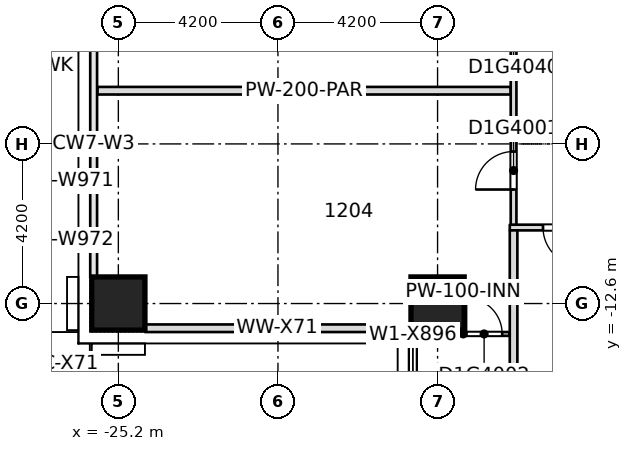
"""IFC4 building model, lengths in metres.
Left out: names, types, materials, properties, quantities, classifications, styles, units other than length and angle.
Written with IfcOpenShell. Run it as: python <this file> out.ifc"""

import sys

from ifc_helpers import new_model, si_unit, direction, frame, frame_2d, origin, origin_2d, place, context, subcontext, project, spatial, rectangle, extrude, element, fill, save


model = new_model("IFC4")
c1 = context("Model", 3, precision=1e-05, world=origin(), true_north=direction((0.0, 1.0)))
c2 = subcontext(c1, "Body", "Model", "MODEL_VIEW")
j1 = project(units=[si_unit("LENGTHUNIT", "METRE"), si_unit("PLANEANGLEUNIT", "RADIAN")], contexts=[c1])
p1 = place(None, origin())
s1 = spatial("IfcSite", under=j1, at=p1, CompositionType="ELEMENT")
p2 = place(p1, origin())
s2 = spatial("IfcBuilding", under=s1, at=p2, CompositionType="ELEMENT")
p3 = place(p2, frame((0.0, 0.0, 55.2)))
s3 = spatial("IfcBuildingStorey", under=s2, at=p3, CompositionType="ELEMENT", Elevation=55.2)
for number, where, z_axis, x_axis in (
    (1, (-25.2, -12.6, -0.32), (0.0, 0.0, 1.0), (1.0, 0.0, 0.0)),
    (2, (-16.8, -12.6, -0.32), (0.0, 0.0, 1.0), (1.0, 0.0, 0.0)),
):
    element("IfcColumn", number, at=place(p3, frame(where, z_axis=z_axis, x_axis=x_axis)), inside=s3, PredefinedType="COLUMN", context=c2, shape_type="SweptSolid", body=[
        extrude(rectangle(XDim=1.4, YDim=1.4, at=origin_2d()), origin(), (0.0, 0.0, 1.0), 3.45),
    ])
p4 = place(p3, frame((-17.35, -13.4, 0.0), z_axis=(0.0, 0.0, 1.0), x_axis=(1.0, 0.0, 0.0)))
e3 = element("IfcWall", 3, at=p4, inside=s3, PredefinedType="PARTITIONING", context=c2, shape_type="SweptSolid", body=[
    extrude(rectangle(XDim=2.45, YDim=0.1, at=frame_2d((1.225, 0.0))), origin(), (0.0, 0.0, 1.0), 3.13),
])
p5 = place(p4, frame((1.3, 0.0, 0.0)))
e4 = element("IfcOpeningElement", 4, at=p5, cuts=e3, PredefinedType="OPENING", context=c2, shape_type="SweptSolid", body=[
    extrude(rectangle(XDim=0.95, YDim=2.1, at=frame_2d((0.475, 1.05))), frame((0.0, 0.06, 0.0), z_axis=(0.0, -1.0, 0.0), x_axis=(1.0, 0.0, 0.0)), (0.0, 0.0, 1.0), 0.12),
])
p6 = place(p3, frame((-14.9, -10.6, 0.0), z_axis=(0.0, 0.0, 1.0), x_axis=(1.0, 0.0, 0.0)))
e5 = element("IfcWall", 5, at=p6, inside=s3, PredefinedType="PARTITIONING", context=c2, shape_type="SweptSolid", body=[
    extrude(rectangle(XDim=10.4, YDim=0.15, at=frame_2d((5.2, 0.0))), origin(), (0.0, 0.0, 1.0), 3.13),
])
p7 = place(p6, frame((7.325, 0.0, 0.0)))
e6 = element("IfcOpeningElement", 6, at=p7, cuts=e5, PredefinedType="OPENING", context=c2, shape_type="SweptSolid", body=[
    extrude(rectangle(XDim=1.0, YDim=2.1, at=frame_2d((0.5, 1.05))), frame((0.0, 0.085, 0.0), z_axis=(0.0, -1.0, 0.0), x_axis=(1.0, 0.0, 0.0)), (0.0, 0.0, 1.0), 0.17),
])
p8 = place(p6, frame((3.95, 0.0, 0.0)))
e7 = element("IfcOpeningElement", 7, at=p8, cuts=e5, PredefinedType="OPENING", context=c2, shape_type="SweptSolid", body=[
    extrude(rectangle(XDim=1.1, YDim=2.1, at=frame_2d((0.55, 1.05))), frame((0.0, 0.085, 0.0), z_axis=(0.0, -1.0, 0.0), x_axis=(1.0, 0.0, 0.0)), (0.0, 0.0, 1.0), 0.17),
])
p9 = place(p6, frame((0.875, 0.0, 0.0)))
e8 = element("IfcOpeningElement", 8, at=p9, cuts=e5, PredefinedType="OPENING", context=c2, shape_type="SweptSolid", body=[
    extrude(rectangle(XDim=1.0, YDim=2.1, at=frame_2d((0.5, 1.05))), frame((0.0, 0.085, 0.0), z_axis=(0.0, -1.0, 0.0), x_axis=(1.0, 0.0, 0.0)), (0.0, 0.0, 1.0), 0.17),
])
p10 = place(p3, frame((-25.75, -7.0, 0.0), z_axis=(0.0, 0.0, 1.0), x_axis=(1.0, 0.0, 0.0)))
e9 = element("IfcWall", 9, at=p10, inside=s3, PredefinedType="PARTITIONING", context=c2, shape_type="SweptSolid", body=[
    extrude(rectangle(XDim=10.875, YDim=0.2, at=frame_2d((5.438, 0.0))), origin(), (0.0, 0.0, 1.0), 3.13),
])
p11 = place(p3, frame((-14.8, -19.9, 0.0), z_axis=(0.0, 0.0, 1.0), x_axis=(0.0, 1.0, 0.0)))
e10 = element("IfcWall", 10, at=p11, inside=s3, PredefinedType="PARTITIONING", context=c2, shape_type="SweptSolid", body=[
    extrude(rectangle(XDim=9.225, YDim=0.2, at=frame_2d((4.612, 0.0))), origin(), (0.0, 0.0, 1.0), 3.13),
])
p12 = place(p3, frame((-14.8, -10.525, 0.0), z_axis=(0.0, 0.0, 1.0), x_axis=(0.0, 1.0, 0.0)))
e11 = element("IfcWall", 11, at=p12, inside=s3, PredefinedType="PARTITIONING", context=c2, shape_type="SweptSolid", body=[
    extrude(rectangle(XDim=18.535, YDim=0.15, at=frame_2d((9.268, 0.0))), origin(), (0.0, 0.0, 1.0), 3.13),
])
p13 = place(p12, frame((0.925, 0.0, 0.0)))
e12 = element("IfcOpeningElement", 12, at=p13, cuts=e11, PredefinedType="OPENING", context=c2, shape_type="SweptSolid", body=[
    extrude(rectangle(XDim=1.0, YDim=2.1, at=frame_2d((0.5, 1.05))), frame((0.0, 0.085, 0.0), z_axis=(0.0, -1.0, 0.0), x_axis=(1.0, 0.0, 0.0)), (0.0, 0.0, 1.0), 0.17),
])
p14 = place(p12, frame((15.755, 0.0, 0.0)))
e13 = element("IfcOpeningElement", 13, at=p14, cuts=e11, PredefinedType="OPENING", context=c2, shape_type="SweptSolid", body=[
    extrude(rectangle(XDim=1.0, YDim=2.1, at=frame_2d((0.5, 1.05))), frame((0.0, 0.085, 0.0), z_axis=(0.0, -1.0, 0.0), x_axis=(1.0, 0.0, 0.0)), (0.0, 0.0, 1.0), 0.17),
])
p15 = place(p12, frame((9.975, 0.0, 0.0)))
e14 = element("IfcOpeningElement", 14, at=p15, cuts=e11, PredefinedType="OPENING", context=c2, shape_type="SweptSolid", body=[
    extrude(rectangle(XDim=1.1, YDim=2.1, at=frame_2d((0.55, 1.05))), frame((0.0, 0.085, 0.0), z_axis=(0.0, -1.0, 0.0), x_axis=(1.0, 0.0, 0.0)), (0.0, 0.0, 1.0), 0.17),
])
p16 = place(p12, frame((4.725, 0.0, 0.0)))
e15 = element("IfcOpeningElement", 15, at=p16, cuts=e11, PredefinedType="OPENING", context=c2, shape_type="SweptSolid", body=[
    extrude(rectangle(XDim=1.0, YDim=2.1, at=frame_2d((0.5, 1.05))), frame((0.0, 0.085, 0.0), z_axis=(0.0, -1.0, 0.0), x_axis=(1.0, 0.0, 0.0)), (0.0, 0.0, 1.0), 0.17),
])
p17 = place(p3, frame((-24.5, -13.25, 0.0), z_axis=(0.0, 0.0, 1.0), x_axis=(1.0, 0.0, 0.0)))
e16 = element("IfcWall", 16, at=p17, inside=s3, PredefinedType="STANDARD", context=c2, shape_type="SweptSolid", body=[
    extrude(rectangle(XDim=6.95, YDim=0.2, at=frame_2d((3.475, 0.0))), origin(), (0.0, 0.0, 1.0), 3.13),
])
p18 = place(p3, frame((-17.45, -13.35, 0.0), z_axis=(0.0, 0.0, 1.0), x_axis=(0.0, -1.0, 0.0)))
e17 = element("IfcWall", 17, at=p18, inside=s3, PredefinedType="STANDARD", context=c2, shape_type="SweptSolid", body=[
    extrude(rectangle(XDim=6.95, YDim=0.2, at=frame_2d((3.475, 0.0))), origin(), (0.0, 0.0, 1.0), 3.13),
])
p19 = place(p18, frame((3.75, 0.0, 0.2)))
e18 = element("IfcOpeningElement", 18, at=p19, cuts=e17, PredefinedType="OPENING", context=c2, shape_type="SweptSolid", body=[
    extrude(rectangle(XDim=1.8, YDim=2.65, at=frame_2d((0.9, 1.325))), frame((0.0, 0.11, 0.0), z_axis=(0.0, -1.0, 0.0), x_axis=(1.0, 0.0, 0.0)), (0.0, 0.0, 1.0), 0.22),
])
p20 = place(p18, frame((0.275, 0.0, 0.2)))
e19 = element("IfcOpeningElement", 19, at=p20, cuts=e17, PredefinedType="OPENING", context=c2, shape_type="SweptSolid", body=[
    extrude(rectangle(XDim=1.8, YDim=2.65, at=frame_2d((0.9, 1.325))), frame((0.0, 0.11, 0.0), z_axis=(0.0, -1.0, 0.0), x_axis=(1.0, 0.0, 0.0)), (0.0, 0.0, 1.0), 0.22),
])
p21 = place(p13, origin())
e20 = element("IfcDoor", 20, at=p21, inside=s3, OperationType="SINGLE_SWING_LEFT", PredefinedType="DOOR", context=c2, shape_type="SweptSolid", body=[
    extrude(rectangle(XDim=1.0, YDim=2.1, at=frame_2d((0.5, 1.05))), frame((0.0, 0.025, 0.0), z_axis=(0.0, -1.0, 0.0), x_axis=(1.0, 0.0, 0.0)), (0.0, 0.0, 1.0), 0.05),
])
fill(e12, e20)
p22 = place(p5, origin())
e21 = element("IfcDoor", 21, at=p22, inside=s3, OperationType="SINGLE_SWING_RIGHT", PredefinedType="DOOR", context=c2, shape_type="SweptSolid", body=[
    extrude(rectangle(XDim=0.95, YDim=2.1, at=frame_2d((0.475, 1.05))), frame((0.0, 0.025, 0.0), z_axis=(0.0, -1.0, 0.0), x_axis=(1.0, 0.0, 0.0)), (0.0, 0.0, 1.0), 0.05),
])
fill(e4, e21)
p23 = place(p9, origin())
e22 = element("IfcDoor", 22, at=p23, inside=s3, OperationType="SINGLE_SWING_RIGHT", PredefinedType="DOOR", context=c2, shape_type="SweptSolid", body=[
    extrude(rectangle(XDim=1.0, YDim=2.1, at=frame_2d((0.5, 1.05))), frame((0.0, 0.025, 0.0), z_axis=(0.0, -1.0, 0.0), x_axis=(1.0, 0.0, 0.0)), (0.0, 0.0, 1.0), 0.05),
])
fill(e8, e22)
p24 = place(p20, origin())
e23 = element("IfcWindow", 23, at=p24, inside=s3, PartitioningType="SINGLE_PANEL", PredefinedType="WINDOW", context=c2, shape_type="SweptSolid", body=[
    extrude(rectangle(XDim=1.8, YDim=2.65, at=frame_2d((0.9, 1.325))), frame((0.0, 0.03, 0.0), z_axis=(0.0, -1.0, 0.0), x_axis=(1.0, 0.0, 0.0)), (0.0, 0.0, 1.0), 0.06),
])
fill(e19, e23)
save(model, sys.argv[1])
